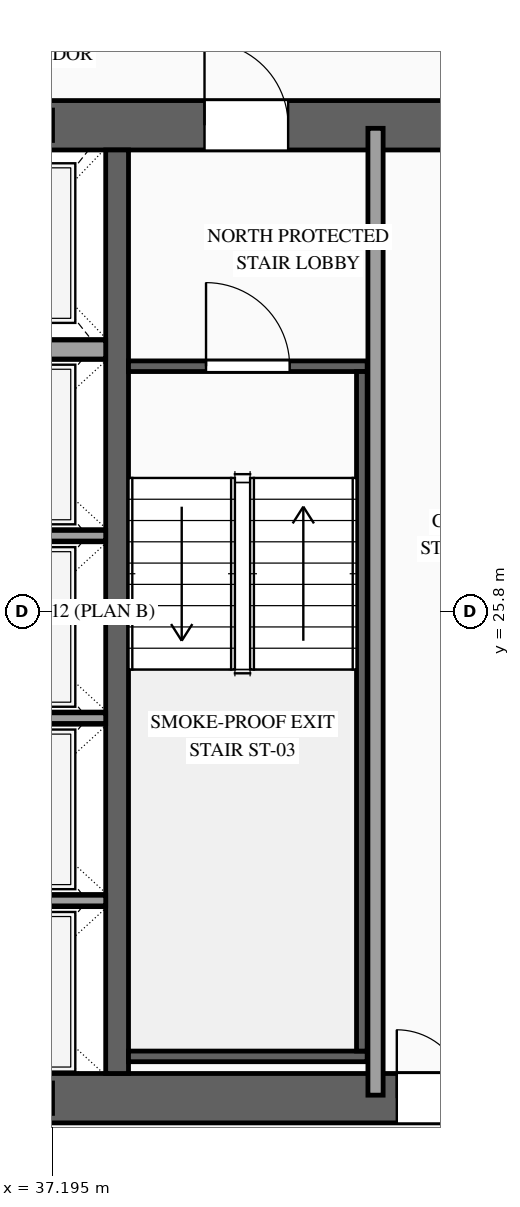
"""IFC4 building model, lengths in metres.
Left out: names, types, materials, properties, quantities, classifications, styles, units other than length and angle.
Written with IfcOpenShell. Run it as: python <this file> out.ifc"""

import sys

from ifc_helpers import new_model, si_unit, direction, frame, frame_2d, origin, place, context, subcontext, project, spatial, rectangle, extrude, source, transform, mapped, element, fill, save


model = new_model("IFC4")
c1 = context("Model", 3, precision=1e-05, world=origin(), true_north=direction((0.0, 1.0)))
c2 = subcontext(c1, "Body", "Model", "MODEL_VIEW")
j1 = project(units=[si_unit("LENGTHUNIT", "METRE"), si_unit("PLANEANGLEUNIT", "RADIAN")], contexts=[c1])
p1 = place(None, origin())
s1 = spatial("IfcSite", under=j1, at=p1, CompositionType="ELEMENT")
p2 = place(p1, origin())
s2 = spatial("IfcBuilding", under=s1, at=p2, CompositionType="ELEMENT")
p3 = place(p2, frame((0.0, 0.0, 205.5)))
s3 = spatial("IfcBuildingStorey", under=s2, at=p3, CompositionType="ELEMENT", Elevation=205.5)
p4 = place(p3, frame((23.475, 19.4, 0.0), z_axis=(0.0, 0.0, 1.0), x_axis=(1.0, 0.0, 0.0)))
e1 = element("IfcWall", 1, at=p4, inside=s3, PredefinedType="SHEAR", context=c2, shape_type="SweptSolid", body=[
    extrude(rectangle(XDim=27.05, YDim=0.65, at=frame_2d((13.525, 0.0))), origin(), (0.0, 0.0, 1.0), 3.5),
])
p5 = place(p4, frame((1.975, 0.0, 0.0)))
e2 = element("IfcOpeningElement", 2, at=p5, cuts=e1, PredefinedType="OPENING", context=c2, shape_type="SweptSolid", body=[
    extrude(rectangle(XDim=1.1, YDim=2.2, at=frame_2d((0.55, 1.1))), frame((0.0, 0.34, 0.0), z_axis=(0.0, -1.0, 0.0), x_axis=(1.0, 0.0, 0.0)), (0.0, 0.0, 1.0), 0.68),
])
p6 = place(p4, frame((9.875, 0.0, 0.0)))
e3 = element("IfcOpeningElement", 3, at=p6, cuts=e1, PredefinedType="OPENING", context=c2, shape_type="SweptSolid", body=[
    extrude(rectangle(XDim=1.1, YDim=2.2, at=frame_2d((0.55, 1.1))), frame((0.0, 0.34, 0.0), z_axis=(0.0, -1.0, 0.0), x_axis=(1.0, 0.0, 0.0)), (0.0, 0.0, 1.0), 0.68),
])
p7 = place(p4, frame((23.075, 0.0, 0.0)))
e4 = element("IfcOpeningElement", 4, at=p7, cuts=e1, PredefinedType="OPENING", context=c2, shape_type="SweptSolid", body=[
    extrude(rectangle(XDim=1.1, YDim=2.2, at=frame_2d((0.55, 1.1))), frame((0.0, 0.34, 0.0), z_axis=(0.0, -1.0, 0.0), x_axis=(1.0, 0.0, 0.0)), (0.0, 0.0, 1.0), 0.68),
])
p8 = place(p4, frame((19.695, 0.0, 0.0)))
e5 = element("IfcOpeningElement", 5, at=p8, cuts=e1, PredefinedType="OPENING", context=c2, shape_type="SweptSolid", body=[
    extrude(rectangle(XDim=0.9, YDim=2.15, at=frame_2d((0.45, 1.075))), frame((0.0, 0.34, 0.0), z_axis=(0.0, -1.0, 0.0), x_axis=(1.0, 0.0, 0.0)), (0.0, 0.0, 1.0), 0.68),
])
p9 = place(p4, frame((18.255, 0.0, 0.0)))
e6 = element("IfcOpeningElement", 6, at=p9, cuts=e1, PredefinedType="OPENING", context=c2, shape_type="SweptSolid", body=[
    extrude(rectangle(XDim=0.9, YDim=2.15, at=frame_2d((0.45, 1.075))), frame((0.0, 0.34, 0.0), z_axis=(0.0, -1.0, 0.0), x_axis=(1.0, 0.0, 0.0)), (0.0, 0.0, 1.0), 0.68),
])
p10 = place(p3, frame((23.475, 32.2, 0.0), z_axis=(0.0, 0.0, 1.0), x_axis=(1.0, 0.0, 0.0)))
e7 = element("IfcWall", 7, at=p10, inside=s3, PredefinedType="SHEAR", context=c2, shape_type="SweptSolid", body=[
    extrude(rectangle(XDim=27.05, YDim=0.65, at=frame_2d((13.525, 0.0))), origin(), (0.0, 0.0, 1.0), 3.5),
])
p11 = place(p10, frame((4.595, 0.0, 0.0)))
e8 = element("IfcOpeningElement", 8, at=p11, cuts=e7, PredefinedType="OPENING", context=c2, shape_type="SweptSolid", body=[
    extrude(rectangle(XDim=0.9, YDim=2.15, at=frame_2d((0.45, 1.075))), frame((0.0, 0.34, 0.0), z_axis=(0.0, -1.0, 0.0), x_axis=(1.0, 0.0, 0.0)), (0.0, 0.0, 1.0), 0.68),
])
p12 = place(p10, frame((9.875, 0.0, 0.0)))
e9 = element("IfcOpeningElement", 9, at=p12, cuts=e7, PredefinedType="OPENING", context=c2, shape_type="SweptSolid", body=[
    extrude(rectangle(XDim=1.1, YDim=2.2, at=frame_2d((0.55, 1.1))), frame((0.0, 0.34, 0.0), z_axis=(0.0, -1.0, 0.0), x_axis=(1.0, 0.0, 0.0)), (0.0, 0.0, 1.0), 0.68),
])
p13 = place(p10, frame((15.725, 0.0, 0.0)))
e10 = element("IfcOpeningElement", 10, at=p13, cuts=e7, PredefinedType="OPENING", context=c2, shape_type="SweptSolid", body=[
    extrude(rectangle(XDim=1.1, YDim=2.2, at=frame_2d((0.55, 1.1))), frame((0.0, 0.34, 0.0), z_axis=(0.0, -1.0, 0.0), x_axis=(1.0, 0.0, 0.0)), (0.0, 0.0, 1.0), 0.68),
])
m1 = source(origin(), c2, "Body", "SweptSolid", [
    extrude(rectangle(XDim=12.15, YDim=0.3, at=frame_2d((6.075, 0.0))), origin(), (0.0, 0.0, 1.0), 3.5),
])
p14 = place(p3, frame((38.05, 19.725, 0.0), z_axis=(0.0, 0.0, 1.0), x_axis=(0.0, 1.0, 0.0)))
e11 = element("IfcWall", 11, at=p14, inside=s3, PredefinedType="SOLIDWALL", context=c2, shape_type="MappedRepresentation", body=[
    mapped(m1, transform((0.0, 0.0, 0.0), scale=1.0)),
])
m2 = source(origin(), c2, "Body", "SweptSolid", [
    extrude(rectangle(XDim=2.4, YDim=0.14, at=frame_2d((1.2, 0.0))), origin(), (0.0, 0.0, 1.0), 3.28),
])
for number, where, z_axis, x_axis in (
    (12, (35.5, 22.0, 0.0), (0.0, 0.0, 1.0), (1.0, 0.0, 0.0)),
    (13, (35.5, 24.4, 0.0), (0.0, 0.0, 1.0), (1.0, 0.0, 0.0)),
    (14, (35.5, 26.8, 0.0), (0.0, 0.0, 1.0), (1.0, 0.0, 0.0)),
):
    element("IfcWall", number, at=place(p3, frame(where, z_axis=z_axis, x_axis=x_axis)), inside=s3, PredefinedType="SOLIDWALL", context=c2, shape_type="MappedRepresentation", body=[
        mapped(m2, transform((0.0, 0.0, 0.0), scale=1.0)),
    ])
m3 = source(origin(), c2, "Body", "SweptSolid", [
    extrude(rectangle(XDim=2.4, YDim=0.25, at=frame_2d((1.2, 0.0))), origin(), (0.0, 0.0, 1.0), 3.28),
])
p15 = place(p3, frame((35.5, 29.25, 0.0), z_axis=(0.0, 0.0, 1.0), x_axis=(1.0, 0.0, 0.0)))
e15 = element("IfcWall", 15, at=p15, inside=s3, PredefinedType="SOLIDWALL", context=c2, shape_type="MappedRepresentation", body=[
    mapped(m3, transform((0.0, 0.0, 0.0), scale=1.0)),
])
p16 = place(p3, frame((38.2, 29.03, 0.0), z_axis=(0.0, 0.0, 1.0), x_axis=(1.0, 0.0, 0.0)))
e16 = element("IfcWall", 16, at=p16, inside=s3, PredefinedType="SOLIDWALL", context=c2, shape_type="SweptSolid", body=[
    extrude(rectangle(XDim=3.14, YDim=0.14, at=frame_2d((1.57, 0.0))), origin(), (0.0, 0.0, 1.0), 3.28),
])
p17 = place(p16, frame((1.02, 0.0, 0.0)))
e17 = element("IfcOpeningElement", 17, at=p17, cuts=e16, PredefinedType="OPENING", context=c2, shape_type="SweptSolid", body=[
    extrude(rectangle(XDim=1.1, YDim=2.2, at=frame_2d((0.55, 1.1))), frame((0.0, 0.085, 0.0), z_axis=(0.0, -1.0, 0.0), x_axis=(1.0, 0.0, 0.0)), (0.0, 0.0, 1.0), 0.17),
])
m4 = source(origin(), c2, "Body", "SweptSolid", [
    extrude(rectangle(XDim=3.14, YDim=0.14, at=frame_2d((1.57, 0.0))), origin(), (0.0, 0.0, 1.0), 3.28),
])
p18 = place(p3, frame((38.2, 19.95, 0.0), z_axis=(0.0, 0.0, 1.0), x_axis=(1.0, 0.0, 0.0)))
e18 = element("IfcWall", 18, at=p18, inside=s3, PredefinedType="SOLIDWALL", context=c2, shape_type="MappedRepresentation", body=[
    mapped(m4, transform((0.0, 0.0, 0.0), scale=1.0)),
])
m5 = source(origin(), c2, "Body", "SweptSolid", [
    extrude(rectangle(XDim=8.94, YDim=0.14, at=frame_2d((4.47, 0.0))), origin(), (0.0, 0.0, 1.0), 3.28),
])
p19 = place(p3, frame((41.27, 20.02, 0.0), z_axis=(0.0, 0.0, 1.0), x_axis=(0.0, 1.0, 0.0)))
e19 = element("IfcWall", 19, at=p19, inside=s3, PredefinedType="SOLIDWALL", context=c2, shape_type="MappedRepresentation", body=[
    mapped(m5, transform((0.0, 0.0, 0.0), scale=1.0)),
])
m6 = source(origin(), c2, "Body", "SweptSolid", [
    extrude(rectangle(XDim=12.72, YDim=0.2, at=frame_2d((6.36, 0.0))), origin(), (0.0, 0.0, 1.0), 3.28),
])
p20 = place(p3, frame((41.45, 19.44, 0.0), z_axis=(0.0, 0.0, 1.0), x_axis=(0.0, 1.0, 0.0)))
e20 = element("IfcWall", 20, at=p20, inside=s3, PredefinedType="PARTITIONING", context=c2, shape_type="MappedRepresentation", body=[
    mapped(m6, transform((0.0, 0.0, 0.0), scale=1.0)),
])
m7 = source(origin(), c2, "Body", "SweptSolid", [
    extrude(rectangle(XDim=1.1, YDim=2.2, at=frame_2d((0.55, 1.1))), frame((0.0, 0.025, 0.0), z_axis=(0.0, -1.0, 0.0), x_axis=(1.0, 0.0, 0.0)), (0.0, 0.0, 1.0), 0.05),
])
p21 = place(p17, origin())
e21 = element("IfcDoor", 21, at=p21, inside=s3, OperationType="SINGLE_SWING_LEFT", PredefinedType="DOOR", context=c2, shape_type="MappedRepresentation", body=[
    mapped(m7, transform((0.0, 0.0, 0.0), scale=1.0)),
])
fill(e17, e21)
p22 = place(p13, origin())
e22 = element("IfcDoor", 22, at=p22, inside=s3, OperationType="SINGLE_SWING_LEFT", PredefinedType="DOOR", context=c2, shape_type="MappedRepresentation", body=[
    mapped(m7, transform((0.0, 0.0, 0.0), scale=1.0)),
])
fill(e10, e22)
m8 = source(origin(), c2, "Body", "SweptSolid", [
    extrude(rectangle(XDim=0.9, YDim=2.15, at=frame_2d((0.45, 1.075))), frame((0.0, 0.025, 0.0), z_axis=(0.0, -1.0, 0.0), x_axis=(1.0, 0.0, 0.0)), (0.0, 0.0, 1.0), 0.05),
])
p23 = place(p9, origin())
e23 = element("IfcDoor", 23, at=p23, inside=s3, OperationType="SINGLE_SWING_LEFT", PredefinedType="DOOR", context=c2, shape_type="MappedRepresentation", body=[
    mapped(m8, transform((0.0, 0.0, 0.0), scale=1.0)),
])
fill(e6, e23)
save(model, sys.argv[1])
